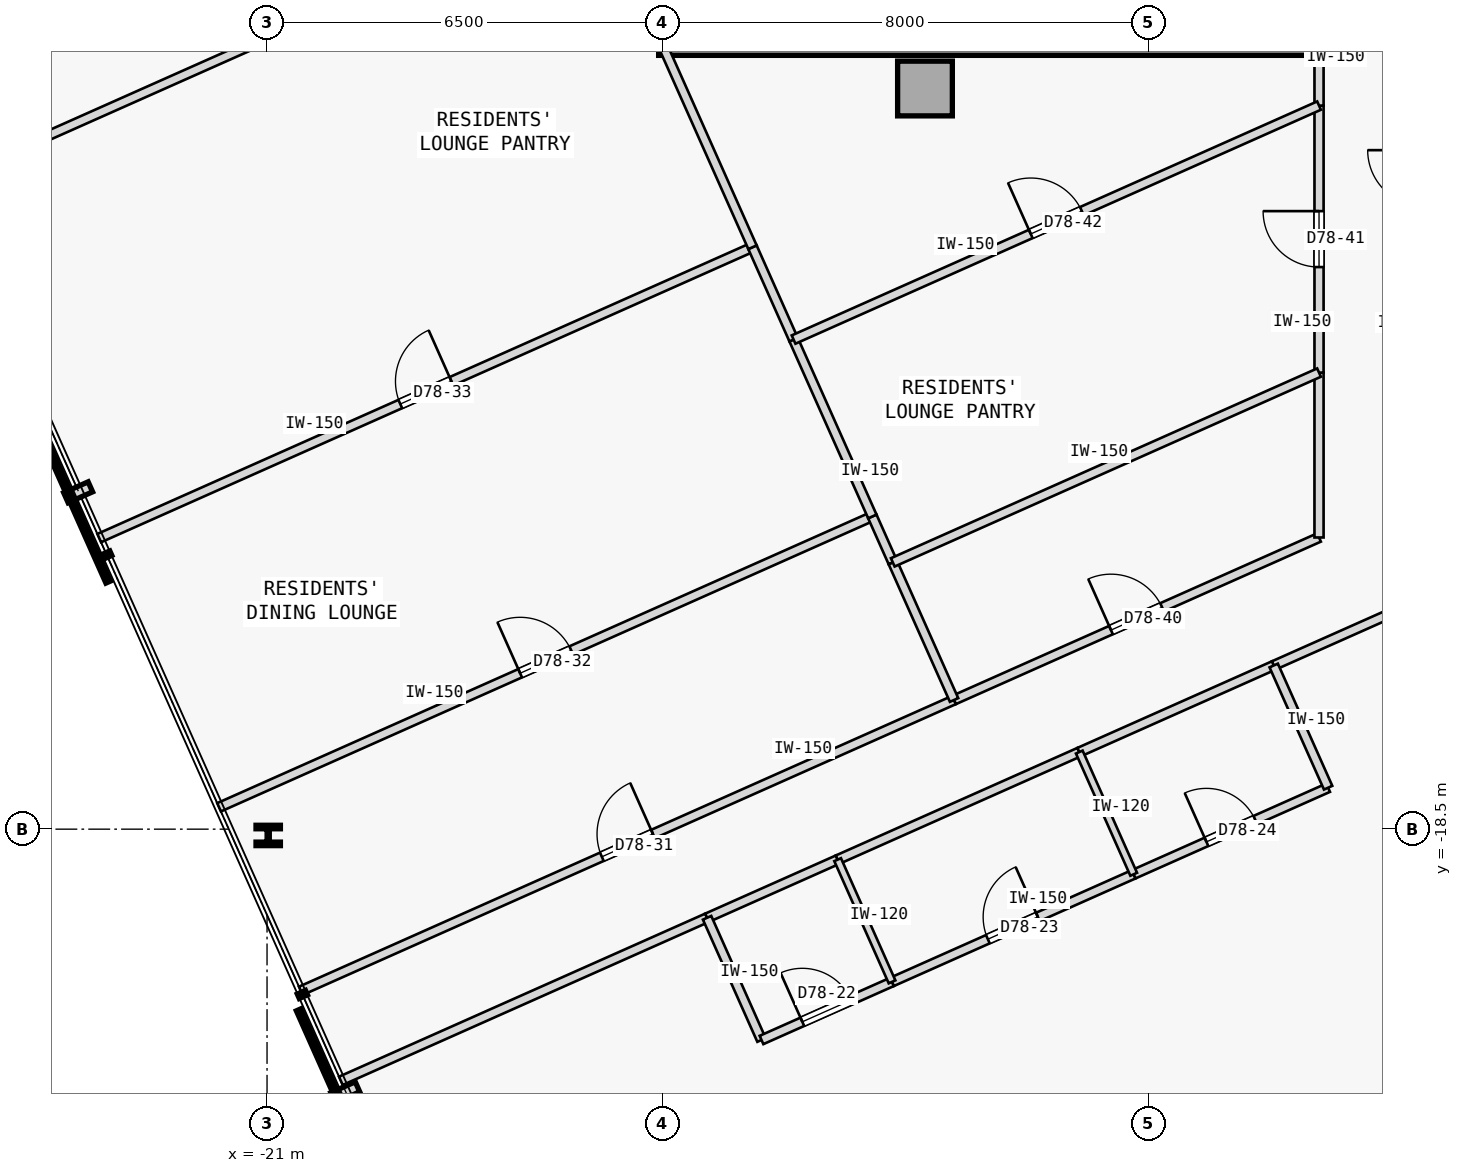
"""IFC4 building model, lengths in metres.
Left out: names, types, materials, properties, quantities, classifications, styles, units other than length and angle.
Written with IfcOpenShell. Run it as: python <this file> out.ifc"""

import sys

from ifc_helpers import new_model, si_unit, direction, frame, frame_2d, origin, origin_2d, place, context, subcontext, project, spatial, rectangle, i_section, extrude, element, fill, save


model = new_model("IFC4")
c1 = context("Model", 3, precision=1e-05, world=origin(), true_north=direction((0.0, 1.0)))
c2 = subcontext(c1, "Body", "Model", "MODEL_VIEW")
j1 = project(units=[si_unit("LENGTHUNIT", "METRE"), si_unit("PLANEANGLEUNIT", "RADIAN")], contexts=[c1])
p1 = place(None, origin())
s1 = spatial("IfcSite", under=j1, at=p1, CompositionType="ELEMENT")
p2 = place(p1, origin())
s2 = spatial("IfcBuilding", under=s1, at=p2, CompositionType="ELEMENT")
p3 = place(p2, frame((0.0, 0.0, 291.95)))
s3 = spatial("IfcBuildingStorey", under=s2, at=p3, CompositionType="ELEMENT", Elevation=291.95)
p4 = place(p3, frame((-10.18, -6.32, 0.0), z_axis=(0.0, 0.0, 1.0), x_axis=(1.0, 0.0, 0.0)))
e1 = element("IfcColumn", 1, at=p4, inside=s3, PredefinedType="COLUMN", context=c2, shape_type="SweptSolid", body=[
    extrude(rectangle(XDim=0.9, YDim=0.9, at=origin_2d()), origin(), (0.0, 0.0, 1.0), 3.35),
])
p5 = place(p3, frame((-14.56, -5.6, 0.0), z_axis=(0.0, 0.0, 1.0), x_axis=(1.0, 0.0, 0.0)))
e2 = element("IfcWall", 2, at=p5, inside=s3, PredefinedType="SHEAR", context=c2, shape_type="SweptSolid", body=[
    extrude(rectangle(XDim=10.86, YDim=0.35, at=frame_2d((5.43, 0.0))), origin(), (0.0, 0.0, 1.0), 3.125),
])
p6 = place(p3, frame((-20.981, -18.603, 0.0), z_axis=(0.0, 0.0, 1.0), x_axis=(1.0, 0.0, 0.0)))
e3 = element("IfcColumn", 3, at=p6, inside=s3, PredefinedType="COLUMN", context=c2, shape_type="SweptSolid", body=[
    extrude(i_section(OverallWidth=0.401, OverallDepth=0.335, WebThickness=0.036, FlangeThickness=0.058, FilletRadius=0.015, at=origin_2d()), origin(), (0.0, 0.0, 1.0), 3.35),
])
p7 = place(p3, frame((-19.786, -22.639, 0.0), z_axis=(0.0, 0.0, 1.0), x_axis=(0.913548717067, 0.406729322211, 0.0)))
e4 = element("IfcWall", 4, at=p7, inside=s3, PredefinedType="PARTITIONING", context=c2, shape_type="SweptSolid", body=[
    extrude(rectangle(XDim=6.593, YDim=0.15, at=frame_2d((3.297, 0.0))), origin(), (0.0, 0.0, 1.0), 3.125),
])
p8 = place(p3, frame((-4.445, -15.808, 0.0), z_axis=(0.0, 0.0, 1.0), x_axis=(0.913546853922, 0.406733506966, 0.0)))
e5 = element("IfcWall", 5, at=p8, inside=s3, PredefinedType="PARTITIONING", context=c2, shape_type="SweptSolid", body=[
    extrude(rectangle(XDim=12.751, YDim=0.15, at=frame_2d((6.375, 0.0))), origin(), (0.0, 0.0, 1.0), 3.125),
])
p9 = place(p8, frame((5.9, 0.0, 0.0)))
e6 = element("IfcOpeningElement", 6, at=p9, cuts=e5, PredefinedType="OPENING", context=c2, shape_type="SweptSolid", body=[
    extrude(rectangle(XDim=0.95, YDim=2.15, at=frame_2d((0.475, 1.075))), frame((0.0, 0.085, 0.0), z_axis=(0.0, -1.0, 0.0), x_axis=(1.0, 0.0, 0.0)), (0.0, 0.0, 1.0), 0.17),
])
p10 = place(p3, frame((-13.763, -19.957, 0.0), z_axis=(0.0, 0.0, 1.0), x_axis=(0.913541436194, 0.406745675276, 0.0)))
e7 = element("IfcWall", 7, at=p10, inside=s3, PredefinedType="PARTITIONING", context=c2, shape_type="SweptSolid", body=[
    extrude(rectangle(XDim=2.35, YDim=0.15, at=frame_2d((1.175, 0.0))), origin(), (0.0, 0.0, 1.0), 3.125),
])
p11 = place(p3, frame((-11.616, -19.001, 0.0), z_axis=(0.0, 0.0, 1.0), x_axis=(0.913545193015, 0.406737237438, 0.0)))
e8 = element("IfcWall", 8, at=p11, inside=s3, PredefinedType="PARTITIONING", context=c2, shape_type="SweptSolid", body=[
    extrude(rectangle(XDim=4.35, YDim=0.15, at=frame_2d((2.175, 0.0))), origin(), (0.0, 0.0, 1.0), 3.125),
])
p12 = place(p3, frame((-7.643, -17.232, 0.0), z_axis=(0.0, 0.0, 1.0), x_axis=(0.913549606868, 0.406727323635, 0.0)))
e9 = element("IfcWall", 9, at=p12, inside=s3, PredefinedType="PARTITIONING", context=c2, shape_type="SweptSolid", body=[
    extrude(rectangle(XDim=3.5, YDim=0.15, at=frame_2d((1.75, 0.0))), origin(), (0.0, 0.0, 1.0), 3.125),
])
p13 = place(p3, frame((-20.445, -21.159, 0.0), z_axis=(0.0, 0.0, 1.0), x_axis=(0.913547681516, 0.406731648137, 0.0)))
e10 = element("IfcWall", 10, at=p13, inside=s3, PredefinedType="PARTITIONING", context=c2, shape_type="SweptSolid", body=[
    extrude(rectangle(XDim=11.76, YDim=0.15, at=frame_2d((5.88, 0.0))), origin(), (0.0, 0.0, 1.0), 3.125),
])
p14 = place(p13, frame((5.42, 0.0, 0.0)))
e11 = element("IfcOpeningElement", 11, at=p14, cuts=e10, PredefinedType="OPENING", context=c2, shape_type="SweptSolid", body=[
    extrude(rectangle(XDim=0.92, YDim=2.15, at=frame_2d((0.46, 1.075))), frame((0.0, 0.085, 0.0), z_axis=(0.0, -1.0, 0.0), x_axis=(1.0, 0.0, 0.0)), (0.0, 0.0, 1.0), 0.17),
])
p15 = place(p3, frame((-9.702, -16.375, 0.0), z_axis=(0.0, 0.0, 1.0), x_axis=(0.913552389019, 0.406721074594, 0.0)))
e12 = element("IfcWall", 12, at=p15, inside=s3, PredefinedType="PARTITIONING", context=c2, shape_type="SweptSolid", body=[
    extrude(rectangle(XDim=6.57, YDim=0.15, at=frame_2d((3.285, 0.0))), origin(), (0.0, 0.0, 1.0), 3.125),
])
p16 = place(p15, frame((2.825, 0.0, 0.0)))
e13 = element("IfcOpeningElement", 13, at=p16, cuts=e12, PredefinedType="OPENING", context=c2, shape_type="SweptSolid", body=[
    extrude(rectangle(XDim=0.92, YDim=2.15, at=frame_2d((0.46, 1.075))), frame((0.0, 0.085, 0.0), z_axis=(0.0, -1.0, 0.0), x_axis=(1.0, 0.0, 0.0)), (0.0, 0.0, 1.0), 0.17),
])
p17 = place(p3, frame((-3.7, -13.703, 0.0), z_axis=(0.0, 0.0, 1.0), x_axis=(9.0033312e-05, 0.999999995947, 0.0)))
e14 = element("IfcWall", 14, at=p17, inside=s3, PredefinedType="PARTITIONING", context=c2, shape_type="SweptSolid", body=[
    extrude(rectangle(XDim=2.712, YDim=0.15, at=frame_2d((1.356, 0.0))), origin(), (0.0, 0.0, 1.0), 3.125),
])
p18 = place(p3, frame((-3.7, -10.992, 0.0), z_axis=(0.0, 0.0, 1.0), x_axis=(0.0, 1.0, 0.0)))
e15 = element("IfcWall", 15, at=p18, inside=s3, PredefinedType="PARTITIONING", context=c2, shape_type="SweptSolid", body=[
    extrude(rectangle(XDim=4.391, YDim=0.15, at=frame_2d((2.195, 0.0))), origin(), (0.0, 0.0, 1.0), 3.125),
])
p19 = place(p18, frame((1.735, 0.0, 0.0)))
e16 = element("IfcOpeningElement", 16, at=p19, cuts=e15, PredefinedType="OPENING", context=c2, shape_type="SweptSolid", body=[
    extrude(rectangle(XDim=0.92, YDim=2.15, at=frame_2d((0.46, 1.075))), frame((0.0, 0.085, 0.0), z_axis=(0.0, -1.0, 0.0), x_axis=(1.0, 0.0, 0.0)), (0.0, 0.0, 1.0), 0.17),
])
p20 = place(p3, frame((-3.7, -6.601, 0.0), z_axis=(0.0, 0.0, 1.0), x_axis=(-0.000243783513, 0.999999970285, 0.0)))
e17 = element("IfcWall", 17, at=p20, inside=s3, PredefinedType="PARTITIONING", context=c2, shape_type="SweptSolid", body=[
    extrude(rectangle(XDim=1.001, YDim=0.15, at=frame_2d((0.501, 0.0))), origin(), (0.0, 0.0, 1.0), 3.125),
])
p21 = place(p3, frame((-12.868, -21.967, 0.0), z_axis=(0.0, 0.0, 1.0), x_axis=(-0.406725294076, 0.913550510459, 0.0)))
e18 = element("IfcWall", 18, at=p21, inside=s3, PredefinedType="PARTITIONING", context=c2, shape_type="SweptSolid", body=[
    extrude(rectangle(XDim=2.2, YDim=0.15, at=frame_2d((1.1, 0.0))), origin(), (0.0, 0.0, 1.0), 3.125),
])
p22 = place(p3, frame((-12.868, -21.967, 0.0), z_axis=(0.0, 0.0, 1.0), x_axis=(0.913541436194, 0.406745675276, 0.0)))
e19 = element("IfcWall", 19, at=p22, inside=s3, PredefinedType="PARTITIONING", context=c2, shape_type="SweptSolid", body=[
    extrude(rectangle(XDim=2.35, YDim=0.15, at=frame_2d((1.175, 0.0))), origin(), (0.0, 0.0, 1.0), 3.125),
])
p23 = place(p22, frame((0.735, 0.0, 0.0)))
e20 = element("IfcOpeningElement", 20, at=p23, cuts=e19, PredefinedType="OPENING", context=c2, shape_type="SweptSolid", body=[
    extrude(rectangle(XDim=0.88, YDim=2.15, at=frame_2d((0.44, 1.075))), frame((0.0, 0.085, 0.0), z_axis=(0.0, -1.0, 0.0), x_axis=(1.0, 0.0, 0.0)), (0.0, 0.0, 1.0), 0.17),
])
p24 = place(p3, frame((-10.722, -21.011, 0.0), z_axis=(0.0, 0.0, 1.0), x_axis=(0.913545193015, 0.406737237438, 0.0)))
e21 = element("IfcWall", 21, at=p24, inside=s3, PredefinedType="PARTITIONING", context=c2, shape_type="SweptSolid", body=[
    extrude(rectangle(XDim=4.35, YDim=0.15, at=frame_2d((2.175, 0.0))), origin(), (0.0, 0.0, 1.0), 3.125),
])
p25 = place(p24, frame((1.725, 0.0, 0.0)))
e22 = element("IfcOpeningElement", 22, at=p25, cuts=e21, PredefinedType="OPENING", context=c2, shape_type="SweptSolid", body=[
    extrude(rectangle(XDim=0.9, YDim=2.15, at=frame_2d((0.45, 1.075))), frame((0.0, 0.085, 0.0), z_axis=(0.0, -1.0, 0.0), x_axis=(1.0, 0.0, 0.0)), (0.0, 0.0, 1.0), 0.17),
])
p26 = place(p3, frame((-6.748, -19.242, 0.0), z_axis=(0.0, 0.0, 1.0), x_axis=(0.913549606868, 0.406727323635, 0.0)))
e23 = element("IfcWall", 23, at=p26, inside=s3, PredefinedType="PARTITIONING", context=c2, shape_type="SweptSolid", body=[
    extrude(rectangle(XDim=3.5, YDim=0.15, at=frame_2d((1.75, 0.0))), origin(), (0.0, 0.0, 1.0), 3.125),
])
p27 = place(p26, frame((1.31, 0.0, 0.0)))
e24 = element("IfcOpeningElement", 24, at=p27, cuts=e23, PredefinedType="OPENING", context=c2, shape_type="SweptSolid", body=[
    extrude(rectangle(XDim=0.88, YDim=2.15, at=frame_2d((0.44, 1.075))), frame((0.0, 0.085, 0.0), z_axis=(0.0, -1.0, 0.0), x_axis=(1.0, 0.0, 0.0)), (0.0, 0.0, 1.0), 0.17),
])
p28 = place(p3, frame((-3.55, -17.818, 0.0), z_axis=(0.0, 0.0, 1.0), x_axis=(-0.406725294076, 0.913550510459, 0.0)))
e25 = element("IfcWall", 25, at=p28, inside=s3, PredefinedType="PARTITIONING", context=c2, shape_type="SweptSolid", body=[
    extrude(rectangle(XDim=2.2, YDim=0.15, at=frame_2d((1.1, 0.0))), origin(), (0.0, 0.0, 1.0), 3.125),
])
for number, where, z_axis, x_axis in (
    (26, (-10.722, -21.011, 0.0), (0.0, 0.0, 1.0), (-0.407, 0.914, 0.0)),
    (27, (-6.748, -19.242, 0.0), (0.0, 0.0, 1.0), (-0.407, 0.914, 0.0)),
):
    element("IfcWall", number, at=place(p3, frame(where, z_axis=z_axis, x_axis=x_axis)), inside=s3, PredefinedType="PARTITIONING", context=c2, shape_type="SweptSolid", body=[
        extrude(rectangle(XDim=2.2, YDim=0.12, at=frame_2d((1.1, 0.0))), origin(), (0.0, 0.0, 1.0), 3.125),
    ])
p29 = place(p3, frame((-21.789, -18.14, 0.0), z_axis=(0.0, 0.0, 1.0), x_axis=(0.913544247064, 0.406739362069, 0.0)))
e28 = element("IfcWall", 28, at=p29, inside=s3, PredefinedType="PARTITIONING", context=c2, shape_type="SweptSolid", body=[
    extrude(rectangle(XDim=11.76, YDim=0.15, at=frame_2d((5.88, 0.0))), origin(), (0.0, 0.0, 1.0), 3.125),
])
p30 = place(p29, frame((5.42, 0.0, 0.0)))
e29 = element("IfcOpeningElement", 29, at=p30, cuts=e28, PredefinedType="OPENING", context=c2, shape_type="SweptSolid", body=[
    extrude(rectangle(XDim=0.92, YDim=2.15, at=frame_2d((0.46, 1.075))), frame((0.0, 0.085, 0.0), z_axis=(0.0, -1.0, 0.0), x_axis=(1.0, 0.0, 0.0)), (0.0, 0.0, 1.0), 0.17),
])
p31 = place(p3, frame((-9.702, -16.375, 0.0), z_axis=(0.0, 0.0, 1.0), x_axis=(-0.406787689018, 0.913522728816, 0.0)))
e30 = element("IfcWall", 30, at=p31, inside=s3, PredefinedType="PARTITIONING", context=c2, shape_type="SweptSolid", body=[
    extrude(rectangle(XDim=2.477, YDim=0.15, at=frame_2d((1.238, 0.0))), origin(), (0.0, 0.0, 1.0), 3.125),
])
p32 = place(p3, frame((-10.709, -14.113, 0.0), z_axis=(0.0, 0.0, 1.0), x_axis=(-0.406740884734, 0.913543569123, 0.0)))
e31 = element("IfcWall", 31, at=p32, inside=s3, PredefinedType="PARTITIONING", context=c2, shape_type="SweptSolid", body=[
    extrude(rectangle(XDim=0.827, YDim=0.15, at=frame_2d((0.414, 0.0))), origin(), (0.0, 0.0, 1.0), 3.125),
])
p33 = place(p3, frame((-23.76, -13.713, 0.0), z_axis=(0.0, 0.0, 1.0), x_axis=(0.913544247064, 0.406739362069, 0.0)))
e32 = element("IfcWall", 32, at=p33, inside=s3, PredefinedType="PARTITIONING", context=c2, shape_type="SweptSolid", body=[
    extrude(rectangle(XDim=11.76, YDim=0.15, at=frame_2d((5.88, 0.0))), origin(), (0.0, 0.0, 1.0), 3.125),
])
p34 = place(p33, frame((5.42, 0.0, 0.0)))
e33 = element("IfcOpeningElement", 33, at=p34, cuts=e32, PredefinedType="OPENING", context=c2, shape_type="SweptSolid", body=[
    extrude(rectangle(XDim=0.92, YDim=2.15, at=frame_2d((0.46, 1.075))), frame((0.0, 0.085, 0.0), z_axis=(0.0, -1.0, 0.0), x_axis=(1.0, 0.0, 0.0)), (0.0, 0.0, 1.0), 0.17),
])
p35 = place(p3, frame((-11.046, -13.357, 0.0), z_axis=(0.0, 0.0, 1.0), x_axis=(-0.406707553978, 0.913558408388, 0.0)))
e34 = element("IfcWall", 34, at=p35, inside=s3, PredefinedType="PARTITIONING", context=c2, shape_type="SweptSolid", body=[
    extrude(rectangle(XDim=3.184, YDim=0.15, at=frame_2d((1.592, 0.0))), origin(), (0.0, 0.0, 1.0), 3.125),
])
p36 = place(p3, frame((-12.341, -10.448, 0.0), z_axis=(0.0, 0.0, 1.0), x_axis=(-0.406751698222, 0.913538754511, 0.0)))
e35 = element("IfcWall", 35, at=p36, inside=s3, PredefinedType="PARTITIONING", context=c2, shape_type="SweptSolid", body=[
    extrude(rectangle(XDim=1.662, YDim=0.15, at=frame_2d((0.831, 0.0))), origin(), (0.0, 0.0, 1.0), 3.125),
])
p37 = place(p3, frame((-26.358, -7.878, 0.0), z_axis=(0.0, 0.0, 1.0), x_axis=(0.913547681516, 0.406731648137, 0.0)))
e36 = element("IfcWall", 36, at=p37, inside=s3, PredefinedType="PARTITIONING", context=c2, shape_type="SweptSolid", body=[
    extrude(rectangle(XDim=11.76, YDim=0.15, at=frame_2d((5.88, 0.0))), origin(), (0.0, 0.0, 1.0), 3.125),
])
p38 = place(p3, frame((-13.017, -8.93, 0.0), z_axis=(0.0, 0.0, 1.0), x_axis=(-0.406722395322, 0.913551801018, 0.0)))
e37 = element("IfcWall", 37, at=p38, inside=s3, PredefinedType="PARTITIONING", context=c2, shape_type="SweptSolid", body=[
    extrude(rectangle(XDim=3.646, YDim=0.15, at=frame_2d((1.823, 0.0))), origin(), (0.0, 0.0, 1.0), 3.125),
])
p39 = place(p3, frame((-10.709, -14.113, 0.0), z_axis=(0.0, 0.0, 1.0), x_axis=(0.91353843513, 0.40675241553, 0.0)))
e38 = element("IfcWall", 38, at=p39, inside=s3, PredefinedType="PARTITIONING", context=c2, shape_type="SweptSolid", body=[
    extrude(rectangle(XDim=7.673, YDim=0.15, at=frame_2d((3.836, 0.0))), origin(), (0.0, 0.0, 1.0), 3.125),
])
p40 = place(p3, frame((-12.341, -10.448, 0.0), z_axis=(0.0, 0.0, 1.0), x_axis=(0.913539934271, 0.406749048544, 0.0)))
e39 = element("IfcWall", 39, at=p40, inside=s3, PredefinedType="PARTITIONING", context=c2, shape_type="SweptSolid", body=[
    extrude(rectangle(XDim=9.459, YDim=0.15, at=frame_2d((4.729, 0.0))), origin(), (0.0, 0.0, 1.0), 3.125),
])
p41 = place(p40, frame((4.27, 0.0, 0.0)))
e40 = element("IfcOpeningElement", 40, at=p41, cuts=e39, PredefinedType="OPENING", context=c2, shape_type="SweptSolid", body=[
    extrude(rectangle(XDim=0.92, YDim=2.15, at=frame_2d((0.46, 1.075))), frame((0.0, 0.085, 0.0), z_axis=(0.0, -1.0, 0.0), x_axis=(1.0, 0.0, 0.0)), (0.0, 0.0, 1.0), 0.17),
])
p42 = place(p23, origin())
e41 = element("IfcDoor", 41, at=p42, inside=s3, OperationType="SINGLE_SWING_LEFT", PredefinedType="DOOR", context=c2, shape_type="SweptSolid", body=[
    extrude(rectangle(XDim=0.88, YDim=2.15, at=frame_2d((0.44, 1.075))), frame((0.0, 0.025, 0.0), z_axis=(0.0, -1.0, 0.0), x_axis=(1.0, 0.0, 0.0)), (0.0, 0.0, 1.0), 0.05),
])
fill(e20, e41)
p43 = place(p25, origin())
e42 = element("IfcDoor", 42, at=p43, inside=s3, OperationType="SINGLE_SWING_RIGHT", PredefinedType="DOOR", context=c2, shape_type="SweptSolid", body=[
    extrude(rectangle(XDim=0.9, YDim=2.15, at=frame_2d((0.45, 1.075))), frame((0.0, 0.025, 0.0), z_axis=(0.0, -1.0, 0.0), x_axis=(1.0, 0.0, 0.0)), (0.0, 0.0, 1.0), 0.05),
])
fill(e22, e42)
p44 = place(p27, origin())
e43 = element("IfcDoor", 43, at=p44, inside=s3, OperationType="SINGLE_SWING_LEFT", PredefinedType="DOOR", context=c2, shape_type="SweptSolid", body=[
    extrude(rectangle(XDim=0.88, YDim=2.15, at=frame_2d((0.44, 1.075))), frame((0.0, 0.025, 0.0), z_axis=(0.0, -1.0, 0.0), x_axis=(1.0, 0.0, 0.0)), (0.0, 0.0, 1.0), 0.05),
])
fill(e24, e43)
p45 = place(p14, origin())
e44 = element("IfcDoor", 44, at=p45, inside=s3, OperationType="SINGLE_SWING_RIGHT", PredefinedType="DOOR", context=c2, shape_type="SweptSolid", body=[
    extrude(rectangle(XDim=0.92, YDim=2.15, at=frame_2d((0.46, 1.075))), frame((0.0, 0.025, 0.0), z_axis=(0.0, -1.0, 0.0), x_axis=(1.0, 0.0, 0.0)), (0.0, 0.0, 1.0), 0.05),
])
fill(e11, e44)
p46 = place(p30, origin())
e45 = element("IfcDoor", 45, at=p46, inside=s3, OperationType="SINGLE_SWING_LEFT", PredefinedType="DOOR", context=c2, shape_type="SweptSolid", body=[
    extrude(rectangle(XDim=0.92, YDim=2.15, at=frame_2d((0.46, 1.075))), frame((0.0, 0.025, 0.0), z_axis=(0.0, -1.0, 0.0), x_axis=(1.0, 0.0, 0.0)), (0.0, 0.0, 1.0), 0.05),
])
fill(e29, e45)
p47 = place(p34, origin())
e46 = element("IfcDoor", 46, at=p47, inside=s3, OperationType="SINGLE_SWING_RIGHT", PredefinedType="DOOR", context=c2, shape_type="SweptSolid", body=[
    extrude(rectangle(XDim=0.92, YDim=2.15, at=frame_2d((0.46, 1.075))), frame((0.0, 0.025, 0.0), z_axis=(0.0, -1.0, 0.0), x_axis=(1.0, 0.0, 0.0)), (0.0, 0.0, 1.0), 0.05),
])
fill(e33, e46)
p48 = place(p16, origin())
e47 = element("IfcDoor", 47, at=p48, inside=s3, OperationType="SINGLE_SWING_LEFT", PredefinedType="DOOR", context=c2, shape_type="SweptSolid", body=[
    extrude(rectangle(XDim=0.92, YDim=2.15, at=frame_2d((0.46, 1.075))), frame((0.0, 0.025, 0.0), z_axis=(0.0, -1.0, 0.0), x_axis=(1.0, 0.0, 0.0)), (0.0, 0.0, 1.0), 0.05),
])
fill(e13, e47)
p49 = place(p19, origin())
e48 = element("IfcDoor", 48, at=p49, inside=s3, OperationType="SINGLE_SWING_RIGHT", PredefinedType="DOOR", context=c2, shape_type="SweptSolid", body=[
    extrude(rectangle(XDim=0.92, YDim=2.15, at=frame_2d((0.46, 1.075))), frame((0.0, 0.025, 0.0), z_axis=(0.0, -1.0, 0.0), x_axis=(1.0, 0.0, 0.0)), (0.0, 0.0, 1.0), 0.05),
])
fill(e16, e48)
p50 = place(p41, origin())
e49 = element("IfcDoor", 49, at=p50, inside=s3, OperationType="SINGLE_SWING_LEFT", PredefinedType="DOOR", context=c2, shape_type="SweptSolid", body=[
    extrude(rectangle(XDim=0.92, YDim=2.15, at=frame_2d((0.46, 1.075))), frame((0.0, 0.025, 0.0), z_axis=(0.0, -1.0, 0.0), x_axis=(1.0, 0.0, 0.0)), (0.0, 0.0, 1.0), 0.05),
])
fill(e40, e49)
save(model, sys.argv[1])
